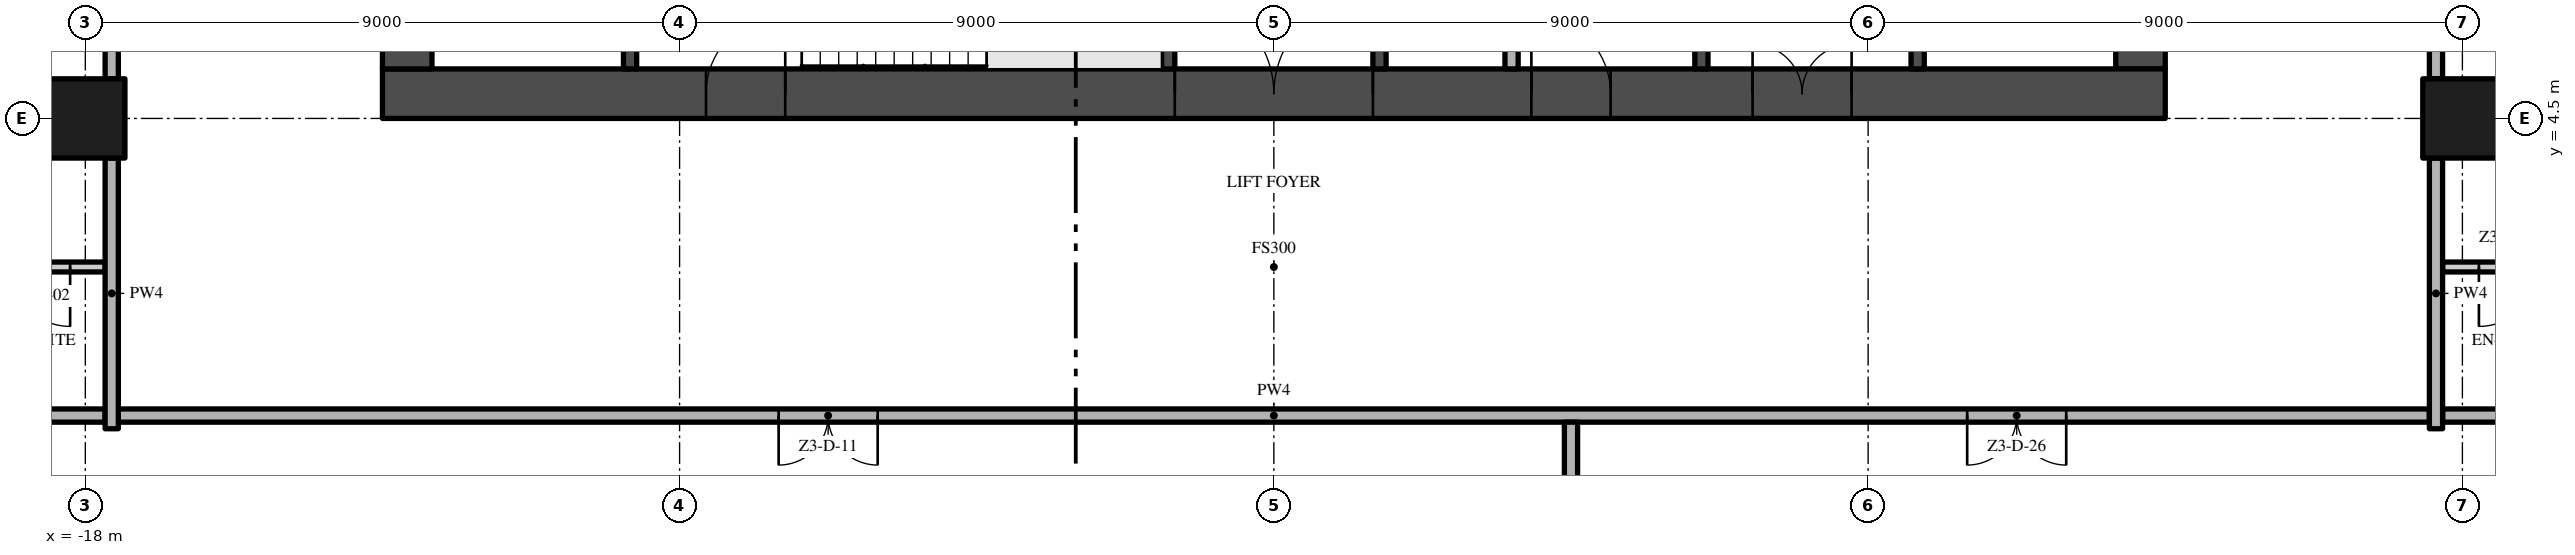
"""IFC4 building model, lengths in metres.
Left out: names, types, materials, properties, quantities, classifications, styles, units other than length and angle.
Written with IfcOpenShell. Run it as: python <this file> out.ifc"""

import sys

from ifc_helpers import new_model, si_unit, direction, frame, frame_2d, origin, origin_2d, place, context, subcontext, project, spatial, rectangle, extrude, element, fill, save


model = new_model("IFC4")
c1 = context("Model", 3, precision=1e-05, world=origin(), true_north=direction((0.0, 1.0)))
c2 = subcontext(c1, "Body", "Model", "MODEL_VIEW")
j1 = project(units=[si_unit("LENGTHUNIT", "METRE"), si_unit("PLANEANGLEUNIT", "RADIAN")], contexts=[c1])
p1 = place(None, origin())
s1 = spatial("IfcSite", under=j1, at=p1, CompositionType="ELEMENT")
p2 = place(p1, origin())
s2 = spatial("IfcBuilding", under=s1, at=p2, CompositionType="ELEMENT")
p3 = place(p2, frame((0.0, 0.0, 159.2)))
s3 = spatial("IfcBuildingStorey", under=s2, at=p3, CompositionType="ELEMENT", Elevation=159.2)
p4 = place(p3, frame((-13.5, 4.875, -0.3), z_axis=(0.0, 0.0, 1.0), x_axis=(1.0, 0.0, 0.0)))
e1 = element("IfcWall", 1, at=p4, inside=s3, PredefinedType="SHEAR", context=c2, shape_type="SweptSolid", body=[
    extrude(rectangle(XDim=27.0, YDim=0.75, at=frame_2d((13.5, 0.0))), origin(), (0.0, 0.0, 1.0), 3.8),
])
p5 = place(p4, frame((12.0, 0.0, 0.3)))
e2 = element("IfcOpeningElement", 2, at=p5, cuts=e1, PredefinedType="OPENING", context=c2, shape_type="SweptSolid", body=[
    extrude(rectangle(XDim=3.0, YDim=2.4, at=frame_2d((1.5, 1.2))), frame((0.0, 0.385, 0.0), z_axis=(0.0, -1.0, 0.0), x_axis=(1.0, 0.0, 0.0)), (0.0, 0.0, 1.0), 0.77),
])
p6 = place(p4, frame((4.9, 0.0, 0.3)))
e3 = element("IfcOpeningElement", 3, at=p6, cuts=e1, PredefinedType="OPENING", context=c2, shape_type="SweptSolid", body=[
    extrude(rectangle(XDim=1.2, YDim=2.2, at=frame_2d((0.6, 1.1))), frame((0.0, 0.385, 0.0), z_axis=(0.0, -1.0, 0.0), x_axis=(1.0, 0.0, 0.0)), (0.0, 0.0, 1.0), 0.77),
])
p7 = place(p4, frame((20.75, 0.0, 0.3)))
e4 = element("IfcOpeningElement", 4, at=p7, cuts=e1, PredefinedType="OPENING", context=c2, shape_type="SweptSolid", body=[
    extrude(rectangle(XDim=1.5, YDim=2.2, at=frame_2d((0.75, 1.1))), frame((0.0, 0.385, 0.0), z_axis=(0.0, -1.0, 0.0), x_axis=(1.0, 0.0, 0.0)), (0.0, 0.0, 1.0), 0.77),
])
p8 = place(p4, frame((17.4, 0.0, 0.3)))
e5 = element("IfcOpeningElement", 5, at=p8, cuts=e1, PredefinedType="OPENING", context=c2, shape_type="SweptSolid", body=[
    extrude(rectangle(XDim=1.2, YDim=2.2, at=frame_2d((0.6, 1.1))), frame((0.0, 0.385, 0.0), z_axis=(0.0, -1.0, 0.0), x_axis=(1.0, 0.0, 0.0)), (0.0, 0.0, 1.0), 0.77),
])
p9 = place(p3, frame((13.125, 5.25, -0.3), z_axis=(0.0, 0.0, 1.0), x_axis=(0.0, 1.0, 0.0)))
e6 = element("IfcWall", 6, at=p9, inside=s3, PredefinedType="SHEAR", context=c2, shape_type="SweptSolid", body=[
    extrude(rectangle(XDim=16.5, YDim=0.75, at=frame_2d((8.25, 0.0))), origin(), (0.0, 0.0, 1.0), 3.8),
])
p10 = place(p9, frame((6.15, 0.0, 0.3)))
e7 = element("IfcOpeningElement", 7, at=p10, cuts=e6, PredefinedType="OPENING", context=c2, shape_type="SweptSolid", body=[
    extrude(rectangle(XDim=1.2, YDim=2.2, at=frame_2d((0.6, 1.1))), frame((0.0, 0.385, 0.0), z_axis=(0.0, -1.0, 0.0), x_axis=(1.0, 0.0, 0.0)), (0.0, 0.0, 1.0), 0.77),
])
p11 = place(p3, frame((-13.125, 21.75, -0.3), z_axis=(0.0, 0.0, 1.0), x_axis=(0.0, -1.0, 0.0)))
e8 = element("IfcWall", 8, at=p11, inside=s3, PredefinedType="SHEAR", context=c2, shape_type="SweptSolid", body=[
    extrude(rectangle(XDim=16.5, YDim=0.75, at=frame_2d((8.25, 0.0))), origin(), (0.0, 0.0, 1.0), 3.8),
])
p12 = place(p11, frame((9.15, 0.0, 0.3)))
e9 = element("IfcOpeningElement", 9, at=p12, cuts=e8, PredefinedType="OPENING", context=c2, shape_type="SweptSolid", body=[
    extrude(rectangle(XDim=1.2, YDim=2.2, at=frame_2d((0.6, 1.1))), frame((0.0, 0.385, 0.0), z_axis=(0.0, -1.0, 0.0), x_axis=(1.0, 0.0, 0.0)), (0.0, 0.0, 1.0), 0.77),
])
for number, where, z_axis, x_axis in (
    (10, (-18.0, 4.5, 0.0), (0.0, 0.0, 1.0), (1.0, 0.0, 0.0)),
    (11, (18.0, 4.5, 0.0), (0.0, 0.0, 1.0), (1.0, 0.0, 0.0)),
):
    element("IfcColumn", number, at=place(p3, frame(where, z_axis=z_axis, x_axis=x_axis)), inside=s3, PredefinedType="COLUMN", context=c2, shape_type="SweptSolid", body=[
        extrude(rectangle(XDim=1.2, YDim=1.2, at=origin_2d()), origin(), (0.0, 0.0, 1.0), 3.5),
    ])
for number, where, z_axis, x_axis in (
    (12, (-9.75, 5.25, 0.0), (0.0, 0.0, 1.0), (0.0, 1.0, 0.0)),
    (13, (-1.6, 5.25, 0.0), (0.0, 0.0, 1.0), (0.0, 1.0, 0.0)),
):
    element("IfcWall", number, at=place(p3, frame(where, z_axis=z_axis, x_axis=x_axis)), inside=s3, PredefinedType="SHEAR", context=c2, shape_type="SweptSolid", body=[
        extrude(rectangle(XDim=2.7, YDim=0.2, at=frame_2d((1.35, 0.0))), origin(), (0.0, 0.0, 1.0), 3.5),
    ])
p13 = place(p3, frame((1.6, 13.5, 0.0), z_axis=(0.0, 0.0, 1.0), x_axis=(0.0, -1.0, 0.0)))
e14 = element("IfcWall", 14, at=p13, inside=s3, PredefinedType="SHEAR", context=c2, shape_type="SweptSolid", body=[
    extrude(rectangle(XDim=8.25, YDim=0.2, at=frame_2d((4.125, 0.0))), origin(), (0.0, 0.0, 1.0), 3.5),
])
p14 = place(p13, frame((3.275, 0.0, 0.0)))
e15 = element("IfcOpeningElement", 15, at=p14, cuts=e14, PredefinedType="OPENING", context=c2, shape_type="SweptSolid", body=[
    extrude(rectangle(XDim=0.9, YDim=2.1, at=frame_2d((0.45, 1.05))), frame((0.0, 0.11, 0.0), z_axis=(0.0, -1.0, 0.0), x_axis=(1.0, 0.0, 0.0)), (0.0, 0.0, 1.0), 0.22),
])
p15 = place(p3, frame((3.6, 13.5, 0.0), z_axis=(0.0, 0.0, 1.0), x_axis=(0.0, -1.0, 0.0)))
e16 = element("IfcWall", 16, at=p15, inside=s3, PredefinedType="PARTITIONING", context=c2, shape_type="SweptSolid", body=[
    extrude(rectangle(XDim=8.25, YDim=0.2, at=frame_2d((4.125, 0.0))), origin(), (0.0, 0.0, 1.0), 3.5),
])
p16 = place(p15, frame((3.675, 0.0, 0.0)))
e17 = element("IfcOpeningElement", 17, at=p16, cuts=e16, PredefinedType="OPENING", context=c2, shape_type="SweptSolid", body=[
    extrude(rectangle(XDim=0.9, YDim=2.1, at=frame_2d((0.45, 1.05))), frame((0.0, 0.11, 0.0), z_axis=(0.0, -1.0, 0.0), x_axis=(1.0, 0.0, 0.0)), (0.0, 0.0, 1.0), 0.22),
])
p17 = place(p3, frame((6.475, 5.25, 0.0), z_axis=(0.0, 0.0, 1.0), x_axis=(0.0, 1.0, 0.0)))
e18 = element("IfcWall", 18, at=p17, inside=s3, PredefinedType="SHEAR", context=c2, shape_type="SweptSolid", body=[
    extrude(rectangle(XDim=6.85, YDim=0.2, at=frame_2d((3.425, 0.0))), origin(), (0.0, 0.0, 1.0), 3.5),
])
p18 = place(p3, frame((9.75, 5.25, 0.0), z_axis=(0.0, 0.0, 1.0), x_axis=(0.0, 1.0, 0.0)))
e19 = element("IfcWall", 19, at=p18, inside=s3, PredefinedType="SHEAR", context=c2, shape_type="SweptSolid", body=[
    extrude(rectangle(XDim=2.35, YDim=0.2, at=frame_2d((1.175, 0.0))), origin(), (0.0, 0.0, 1.0), 3.5),
])
p19 = place(p18, frame((0.7, 0.0, 0.0)))
e20 = element("IfcOpeningElement", 20, at=p19, cuts=e19, PredefinedType="OPENING", context=c2, shape_type="SweptSolid", body=[
    extrude(rectangle(XDim=1.1, YDim=2.1, at=frame_2d((0.55, 1.05))), frame((0.0, 0.11, 0.0), z_axis=(0.0, -1.0, 0.0), x_axis=(1.0, 0.0, 0.0)), (0.0, 0.0, 1.0), 0.22),
])
p20 = place(p3, frame((17.5, 0.0, 0.0), z_axis=(0.0, 0.0, 1.0), x_axis=(-1.0, 0.0, 0.0)))
e21 = element("IfcWall", 21, at=p20, inside=s3, PredefinedType="PARTITIONING", context=c2, shape_type="SweptSolid", body=[
    extrude(rectangle(XDim=35.0, YDim=0.2, at=frame_2d((17.5, 0.0))), origin(), (0.0, 0.0, 1.0), 3.5),
])
p21 = place(p20, frame((23.5, 0.0, 0.0)))
e22 = element("IfcOpeningElement", 22, at=p21, cuts=e21, PredefinedType="OPENING", context=c2, shape_type="SweptSolid", body=[
    extrude(rectangle(XDim=1.5, YDim=2.4, at=frame_2d((0.75, 1.2))), frame((0.0, 0.11, 0.0), z_axis=(0.0, -1.0, 0.0), x_axis=(1.0, 0.0, 0.0)), (0.0, 0.0, 1.0), 0.22),
])
p22 = place(p20, frame((5.5, 0.0, 0.0)))
e23 = element("IfcOpeningElement", 23, at=p22, cuts=e21, PredefinedType="OPENING", context=c2, shape_type="SweptSolid", body=[
    extrude(rectangle(XDim=1.5, YDim=2.4, at=frame_2d((0.75, 1.2))), frame((0.0, 0.11, 0.0), z_axis=(0.0, -1.0, 0.0), x_axis=(1.0, 0.0, 0.0)), (0.0, 0.0, 1.0), 0.22),
])
for number, where, z_axis, x_axis in (
    (24, (-22.2, 0.0, 0.0), (0.0, 0.0, 1.0), (1.0, 0.0, 0.0)),
    (25, (17.7, 0.0, 0.0), (0.0, 0.0, 1.0), (1.0, 0.0, 0.0)),
):
    element("IfcWall", number, at=place(p3, frame(where, z_axis=z_axis, x_axis=x_axis)), inside=s3, PredefinedType="PARTITIONING", context=c2, shape_type="SweptSolid", body=[
        extrude(rectangle(XDim=4.5, YDim=0.2, at=frame_2d((2.25, 0.0))), origin(), (0.0, 0.0, 1.0), 3.5),
    ])
p23 = place(p3, frame((-17.7, 2.25, 0.0), z_axis=(0.0, 0.0, 1.0), x_axis=(-1.0, 0.0, 0.0)))
e26 = element("IfcWall", 26, at=p23, inside=s3, PredefinedType="PARTITIONING", context=c2, shape_type="SweptSolid", body=[
    extrude(rectangle(XDim=2.03, YDim=0.15, at=frame_2d((1.015, 0.0))), origin(), (0.0, 0.0, 1.0), 3.5),
])
p24 = place(p23, frame((0.53, 0.0, 0.0)))
e27 = element("IfcOpeningElement", 27, at=p24, cuts=e26, PredefinedType="OPENING", context=c2, shape_type="SweptSolid", body=[
    extrude(rectangle(XDim=0.9, YDim=2.1, at=frame_2d((0.45, 1.05))), frame((0.0, 0.085, 0.0), z_axis=(0.0, -1.0, 0.0), x_axis=(1.0, 0.0, 0.0)), (0.0, 0.0, 1.0), 0.17),
])
p25 = place(p3, frame((19.73, 2.25, 0.0), z_axis=(0.0, 0.0, 1.0), x_axis=(-1.0, 0.0, 0.0)))
e28 = element("IfcWall", 28, at=p25, inside=s3, PredefinedType="PARTITIONING", context=c2, shape_type="SweptSolid", body=[
    extrude(rectangle(XDim=2.03, YDim=0.15, at=frame_2d((1.015, 0.0))), origin(), (0.0, 0.0, 1.0), 3.5),
])
p26 = place(p25, frame((0.58, 0.0, 0.0)))
e29 = element("IfcOpeningElement", 29, at=p26, cuts=e28, PredefinedType="OPENING", context=c2, shape_type="SweptSolid", body=[
    extrude(rectangle(XDim=0.9, YDim=2.1, at=frame_2d((0.45, 1.05))), frame((0.0, 0.085, 0.0), z_axis=(0.0, -1.0, 0.0), x_axis=(1.0, 0.0, 0.0)), (0.0, 0.0, 1.0), 0.17),
])
p27 = place(p3, frame((-17.6, -0.2, 0.0), z_axis=(0.0, 0.0, 1.0), x_axis=(0.0, 1.0, 0.0)))
e30 = element("IfcWall", 30, at=p27, inside=s3, PredefinedType="PARTITIONING", context=c2, shape_type="SweptSolid", body=[
    extrude(rectangle(XDim=4.1, YDim=0.2, at=frame_2d((2.05, 0.0))), origin(), (0.0, 0.0, 1.0), 3.5),
])
p28 = place(p3, frame((-17.6, 5.1, 0.0), z_axis=(0.0, 0.0, 1.0), x_axis=(0.0, 1.0, 0.0)))
e31 = element("IfcWall", 31, at=p28, inside=s3, PredefinedType="PARTITIONING", context=c2, shape_type="SweptSolid", body=[
    extrude(rectangle(XDim=7.8, YDim=0.2, at=frame_2d((3.9, 0.0))), origin(), (0.0, 0.0, 1.0), 3.5),
])
p29 = place(p28, frame((1.05, 0.0, 0.0)))
e32 = element("IfcOpeningElement", 32, at=p29, cuts=e31, PredefinedType="OPENING", context=c2, shape_type="SweptSolid", body=[
    extrude(rectangle(XDim=1.2, YDim=2.4, at=frame_2d((0.6, 1.2))), frame((0.0, 0.11, 0.0), z_axis=(0.0, -1.0, 0.0), x_axis=(1.0, 0.0, 0.0)), (0.0, 0.0, 1.0), 0.22),
])
p30 = place(p3, frame((4.5, -17.7, 0.0), z_axis=(0.0, 0.0, 1.0), x_axis=(0.0, 1.0, 0.0)))
e33 = element("IfcWall", 33, at=p30, inside=s3, PredefinedType="PARTITIONING", context=c2, shape_type="SweptSolid", body=[
    extrude(rectangle(XDim=17.6, YDim=0.2, at=frame_2d((8.8, 0.0))), origin(), (0.0, 0.0, 1.0), 3.5),
])
p31 = place(p3, frame((17.6, -0.2, 0.0), z_axis=(0.0, 0.0, 1.0), x_axis=(0.0, 1.0, 0.0)))
e34 = element("IfcWall", 34, at=p31, inside=s3, PredefinedType="PARTITIONING", context=c2, shape_type="SweptSolid", body=[
    extrude(rectangle(XDim=4.1, YDim=0.2, at=frame_2d((2.05, 0.0))), origin(), (0.0, 0.0, 1.0), 3.5),
])
p32 = place(p3, frame((17.6, 12.9, 0.0), z_axis=(0.0, 0.0, 1.0), x_axis=(0.0, -1.0, 0.0)))
e35 = element("IfcWall", 35, at=p32, inside=s3, PredefinedType="PARTITIONING", context=c2, shape_type="SweptSolid", body=[
    extrude(rectangle(XDim=7.8, YDim=0.2, at=frame_2d((3.9, 0.0))), origin(), (0.0, 0.0, 1.0), 3.5),
])
p33 = place(p32, frame((5.55, 0.0, 0.0)))
e36 = element("IfcOpeningElement", 36, at=p33, cuts=e35, PredefinedType="OPENING", context=c2, shape_type="SweptSolid", body=[
    extrude(rectangle(XDim=1.2, YDim=2.4, at=frame_2d((0.6, 1.2))), frame((0.0, 0.11, 0.0), z_axis=(0.0, -1.0, 0.0), x_axis=(1.0, 0.0, 0.0)), (0.0, 0.0, 1.0), 0.22),
])
p34 = place(p5, frame((3.0, 0.0, 0.0), z_axis=(0.0, 0.0, 1.0), x_axis=(-1.0, 0.0, 0.0)))
e37 = element("IfcDoor", 37, at=p34, inside=s3, OperationType="DOUBLE_DOOR_SINGLE_SWING", PredefinedType="DOOR", context=c2, shape_type="SweptSolid", body=[
    extrude(rectangle(XDim=3.0, YDim=2.4, at=frame_2d((1.5, 1.2))), frame((0.0, 0.025, 0.0), z_axis=(0.0, -1.0, 0.0), x_axis=(1.0, 0.0, 0.0)), (0.0, 0.0, 1.0), 0.05),
])
fill(e2, e37)
p35 = place(p6, frame((1.2, 0.0, 0.0), z_axis=(0.0, 0.0, 1.0), x_axis=(-1.0, 0.0, 0.0)))
e38 = element("IfcDoor", 38, at=p35, inside=s3, OperationType="SINGLE_SWING_LEFT", PredefinedType="DOOR", context=c2, shape_type="SweptSolid", body=[
    extrude(rectangle(XDim=1.2, YDim=2.2, at=frame_2d((0.6, 1.1))), frame((0.0, 0.025, 0.0), z_axis=(0.0, -1.0, 0.0), x_axis=(1.0, 0.0, 0.0)), (0.0, 0.0, 1.0), 0.05),
])
fill(e3, e38)
p36 = place(p7, frame((1.5, 0.0, 0.0), z_axis=(0.0, 0.0, 1.0), x_axis=(-1.0, 0.0, 0.0)))
e39 = element("IfcDoor", 39, at=p36, inside=s3, OperationType="DOUBLE_DOOR_SINGLE_SWING", PredefinedType="DOOR", context=c2, shape_type="SweptSolid", body=[
    extrude(rectangle(XDim=1.5, YDim=2.2, at=frame_2d((0.75, 1.1))), frame((0.0, 0.025, 0.0), z_axis=(0.0, -1.0, 0.0), x_axis=(1.0, 0.0, 0.0)), (0.0, 0.0, 1.0), 0.05),
])
fill(e4, e39)
p37 = place(p8, frame((1.2, 0.0, 0.0), z_axis=(0.0, 0.0, 1.0), x_axis=(-1.0, 0.0, 0.0)))
e40 = element("IfcDoor", 40, at=p37, inside=s3, OperationType="SINGLE_SWING_RIGHT", PredefinedType="DOOR", context=c2, shape_type="SweptSolid", body=[
    extrude(rectangle(XDim=1.2, YDim=2.2, at=frame_2d((0.6, 1.1))), frame((0.0, 0.025, 0.0), z_axis=(0.0, -1.0, 0.0), x_axis=(1.0, 0.0, 0.0)), (0.0, 0.0, 1.0), 0.05),
])
fill(e5, e40)
p38 = place(p24, origin())
e41 = element("IfcDoor", 41, at=p38, inside=s3, OperationType="SINGLE_SWING_LEFT", PredefinedType="DOOR", context=c2, shape_type="SweptSolid", body=[
    extrude(rectangle(XDim=0.9, YDim=2.1, at=frame_2d((0.45, 1.05))), frame((0.0, 0.025, 0.0), z_axis=(0.0, -1.0, 0.0), x_axis=(1.0, 0.0, 0.0)), (0.0, 0.0, 1.0), 0.05),
])
fill(e27, e41)
p39 = place(p26, origin())
e42 = element("IfcDoor", 42, at=p39, inside=s3, OperationType="SINGLE_SWING_RIGHT", PredefinedType="DOOR", context=c2, shape_type="SweptSolid", body=[
    extrude(rectangle(XDim=0.9, YDim=2.1, at=frame_2d((0.45, 1.05))), frame((0.0, 0.025, 0.0), z_axis=(0.0, -1.0, 0.0), x_axis=(1.0, 0.0, 0.0)), (0.0, 0.0, 1.0), 0.05),
])
fill(e29, e42)
p40 = place(p21, origin())
e43 = element("IfcDoor", 43, at=p40, inside=s3, OperationType="DOUBLE_DOOR_SINGLE_SWING", PredefinedType="DOOR", context=c2, shape_type="SweptSolid", body=[
    extrude(rectangle(XDim=1.5, YDim=2.4, at=frame_2d((0.75, 1.2))), frame((0.0, 0.025, 0.0), z_axis=(0.0, -1.0, 0.0), x_axis=(1.0, 0.0, 0.0)), (0.0, 0.0, 1.0), 0.05),
])
fill(e22, e43)
p41 = place(p22, origin())
e44 = element("IfcDoor", 44, at=p41, inside=s3, OperationType="DOUBLE_DOOR_SINGLE_SWING", PredefinedType="DOOR", context=c2, shape_type="SweptSolid", body=[
    extrude(rectangle(XDim=1.5, YDim=2.4, at=frame_2d((0.75, 1.2))), frame((0.0, 0.025, 0.0), z_axis=(0.0, -1.0, 0.0), x_axis=(1.0, 0.0, 0.0)), (0.0, 0.0, 1.0), 0.05),
])
fill(e23, e44)
save(model, sys.argv[1])
